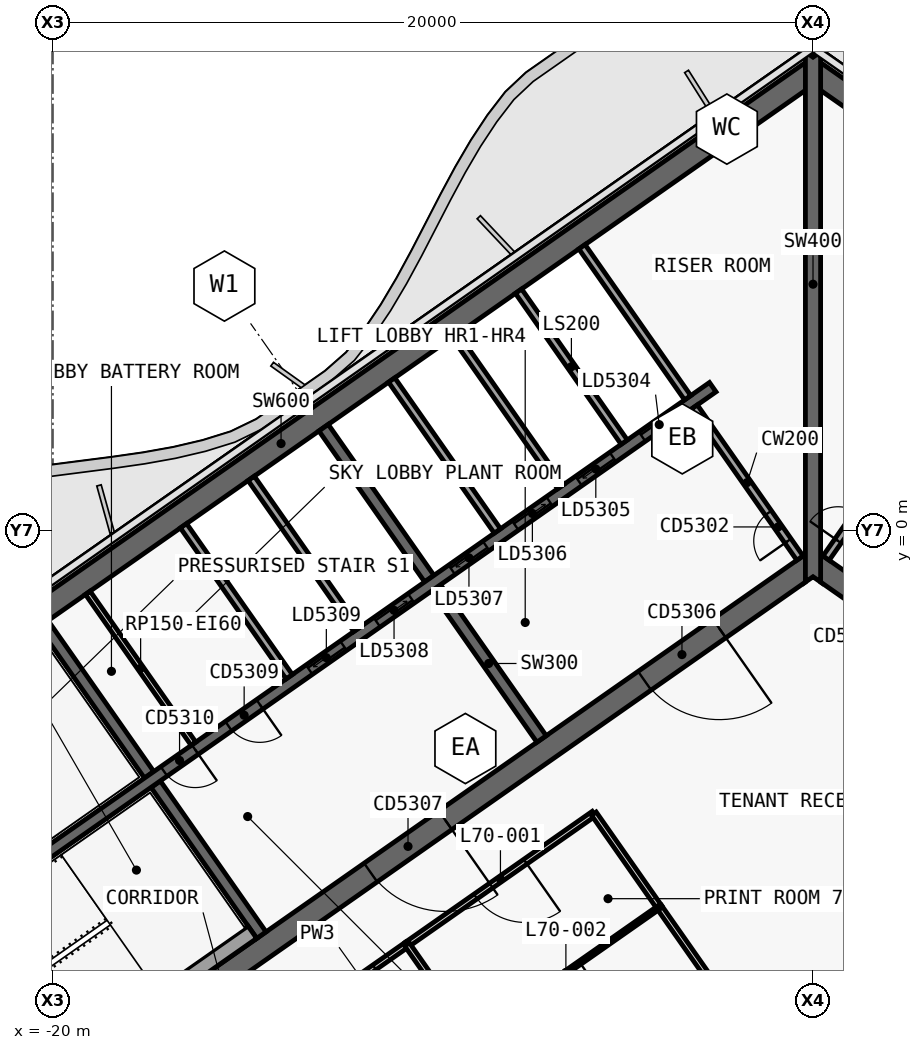
"""IFC4 building model, lengths in metres.
Left out: names, types, materials, properties, quantities, classifications, styles, units other than length and angle.
Written with IfcOpenShell. Run it as: python <this file> out.ifc"""

import sys

from ifc_helpers import new_model, si_unit, direction, frame, frame_2d, origin, place, context, subcontext, project, spatial, polyline, rectangle, outline, extrude, element, fill, save


model = new_model("IFC4")
c1 = context("Model", 3, precision=1e-05, world=origin(), true_north=direction((0.0, 1.0)))
c2 = subcontext(c1, "Body", "Model", "MODEL_VIEW")
j1 = project(units=[si_unit("LENGTHUNIT", "METRE"), si_unit("PLANEANGLEUNIT", "RADIAN")], contexts=[c1])
p1 = place(None, origin())
s1 = spatial("IfcSite", under=j1, at=p1, CompositionType="ELEMENT")
p2 = place(p1, origin())
s2 = spatial("IfcBuilding", under=s1, at=p2, CompositionType="ELEMENT")
p3 = place(p2, frame((0.0, 0.0, 295.6)))
s3 = spatial("IfcBuildingStorey", under=s2, at=p3, CompositionType="ELEMENT", Elevation=295.6)
p4 = place(p3, frame((-0.028, 12.066, 0.0), z_axis=(0.0, 0.0, 1.0), x_axis=(-0.819151382952, -0.573577380837, 0.0)))
e1 = element("IfcWall", 1, at=p4, inside=s3, PredefinedType="SHEAR", context=c2, shape_type="SweptSolid", body=[
    extrude(outline(polyline([(33.898, 0.3), (0.42, 0.3), (0.0, -0.3), (33.898, -0.3), (33.898, 0.3)])), origin(), (0.0, 0.0, 1.0), 3.9),
])
p5 = place(p3, frame((-0.028, -0.874, 0.0), z_axis=(0.0, 0.0, 1.0), x_axis=(-0.819150035022, -0.573579305871, 0.0)))
e2 = element("IfcWall", 2, at=p5, inside=s3, PredefinedType="SHEAR", context=c2, shape_type="SweptSolid", body=[
    extrude(outline(polyline([(26.476, 0.3), (0.42, 0.3), (0.0, -0.3), (26.476, -0.3), (26.476, 0.3)])), origin(), (0.0, 0.0, 1.0), 3.9),
])
p6 = place(p5, frame((2.976, 0.0, 0.0)))
e3 = element("IfcOpeningElement", 3, at=p6, cuts=e2, PredefinedType="OPENING", context=c2, shape_type="SweptSolid", body=[
    extrude(rectangle(XDim=2.4, YDim=2.1, at=frame_2d((1.2, 1.05))), frame((0.0, 0.31, 0.0), z_axis=(0.0, -1.0, 0.0), x_axis=(1.0, 0.0, 0.0)), (0.0, 0.0, 1.0), 0.62),
])
p7 = place(p5, frame((11.776, 0.0, 0.0)))
e4 = element("IfcOpeningElement", 4, at=p7, cuts=e2, PredefinedType="OPENING", context=c2, shape_type="SweptSolid", body=[
    extrude(rectangle(XDim=2.4, YDim=2.1, at=frame_2d((1.2, 1.05))), frame((0.0, 0.31, 0.0), z_axis=(0.0, -1.0, 0.0), x_axis=(1.0, 0.0, 0.0)), (0.0, 0.0, 1.0), 0.62),
])
p8 = place(p3, frame((-7.143, -5.49, 0.0), z_axis=(0.0, 0.0, 1.0), x_axis=(-0.573617744349, 0.819123118565, 0.0)))
e5 = element("IfcWall", 5, at=p8, inside=s3, PredefinedType="SHEAR", context=c2, shape_type="SweptSolid", body=[
    extrude(outline(polyline([(4.85, 0.15), (0.0, 0.15), (0.0, -0.15), (4.85, -0.15), (4.85, 0.15)])), origin(), (0.0, 0.0, 1.0), 3.9),
])
p9 = place(p3, frame((-10.097, -1.271, 0.0), z_axis=(0.0, 0.0, 1.0), x_axis=(-0.573560315113, 0.819163332265, 0.0)))
e6 = element("IfcWall", 6, at=p9, inside=s3, PredefinedType="SHEAR", context=c2, shape_type="SweptSolid", body=[
    extrude(outline(polyline([(4.85, -0.15), (4.85, 0.15), (0.0, 0.15), (0.0, -0.15), (4.85, -0.15)])), origin(), (0.0, 0.0, 1.0), 3.9),
])
p10 = place(p3, frame((-14.515, -10.652, 0.0), z_axis=(0.0, 0.0, 1.0), x_axis=(-0.573560315113, 0.819163332265, 0.0)))
e7 = element("IfcWall", 7, at=p10, inside=s3, PredefinedType="SHEAR", context=c2, shape_type="SweptSolid", body=[
    extrude(outline(polyline([(4.85, 0.15), (0.0, 0.15), (0.0, -0.15), (4.85, -0.15), (4.85, 0.15)])), origin(), (0.0, 0.0, 1.0), 3.9),
])
p11 = place(p3, frame((-17.469, -6.433, 0.0), z_axis=(0.0, 0.0, 1.0), x_axis=(-0.573594092424, 0.81913968109, 0.0)))
e8 = element("IfcWall", 8, at=p11, inside=s3, PredefinedType="SHEAR", context=c2, shape_type="SweptSolid", body=[
    extrude(outline(polyline([(4.85, -0.15), (4.85, 0.15), (0.0, 0.15), (0.0, -0.15), (4.85, -0.15)])), origin(), (0.0, 0.0, 1.0), 3.9),
])
p12 = place(p3, frame((-2.638, 3.768, 0.0), z_axis=(0.0, 0.0, 1.0), x_axis=(-0.819155014212, -0.573572194837, 0.0)))
e9 = element("IfcWall", 9, at=p12, inside=s3, PredefinedType="SHEAR", context=c2, shape_type="SweptSolid", body=[
    extrude(outline(polyline([(26.4, 0.15), (0.0, 0.15), (0.0, -0.15), (26.4, -0.15), (26.4, 0.15)])), origin(), (0.0, 0.0, 1.0), 3.9),
])
p13 = place(p12, frame((1.169, 0.0, 0.0)))
e10 = element("IfcOpeningElement", 10, at=p13, cuts=e9, PredefinedType="OPENING", context=c2, shape_type="SweptSolid", body=[
    extrude(rectangle(XDim=1.1, YDim=2.1, at=frame_2d((0.55, 1.05))), frame((0.0, 0.16, 0.0), z_axis=(0.0, -1.0, 0.0), x_axis=(1.0, 0.0, 0.0)), (0.0, 0.0, 1.0), 0.32),
])
p14 = place(p12, frame((3.206, 0.0, 0.0)))
e11 = element("IfcOpeningElement", 11, at=p14, cuts=e9, PredefinedType="OPENING", context=c2, shape_type="SweptSolid", body=[
    extrude(rectangle(XDim=1.1, YDim=2.1, at=frame_2d((0.55, 1.05))), frame((0.0, 0.16, 0.0), z_axis=(0.0, -1.0, 0.0), x_axis=(1.0, 0.0, 0.0)), (0.0, 0.0, 1.0), 0.32),
])
p15 = place(p12, frame((5.244, 0.0, 0.0)))
e12 = element("IfcOpeningElement", 12, at=p15, cuts=e9, PredefinedType="OPENING", context=c2, shape_type="SweptSolid", body=[
    extrude(rectangle(XDim=1.1, YDim=2.1, at=frame_2d((0.55, 1.05))), frame((0.0, 0.16, 0.0), z_axis=(0.0, -1.0, 0.0), x_axis=(1.0, 0.0, 0.0)), (0.0, 0.0, 1.0), 0.32),
])
p16 = place(p12, frame((7.281, 0.0, 0.0)))
e13 = element("IfcOpeningElement", 13, at=p16, cuts=e9, PredefinedType="OPENING", context=c2, shape_type="SweptSolid", body=[
    extrude(rectangle(XDim=1.1, YDim=2.1, at=frame_2d((0.55, 1.05))), frame((0.0, 0.16, 0.0), z_axis=(0.0, -1.0, 0.0), x_axis=(1.0, 0.0, 0.0)), (0.0, 0.0, 1.0), 0.32),
])
p17 = place(p12, frame((9.688, 0.0, 0.0)))
e14 = element("IfcOpeningElement", 14, at=p17, cuts=e9, PredefinedType="OPENING", context=c2, shape_type="SweptSolid", body=[
    extrude(rectangle(XDim=1.1, YDim=2.1, at=frame_2d((0.55, 1.05))), frame((0.0, 0.16, 0.0), z_axis=(0.0, -1.0, 0.0), x_axis=(1.0, 0.0, 0.0)), (0.0, 0.0, 1.0), 0.32),
])
p18 = place(p12, frame((11.863, 0.0, 0.0)))
e15 = element("IfcOpeningElement", 15, at=p18, cuts=e9, PredefinedType="OPENING", context=c2, shape_type="SweptSolid", body=[
    extrude(rectangle(XDim=1.1, YDim=2.1, at=frame_2d((0.55, 1.05))), frame((0.0, 0.16, 0.0), z_axis=(0.0, -1.0, 0.0), x_axis=(1.0, 0.0, 0.0)), (0.0, 0.0, 1.0), 0.32),
])
p19 = place(p12, frame((14.552, 0.0, 0.0)))
e16 = element("IfcOpeningElement", 16, at=p19, cuts=e9, PredefinedType="OPENING", context=c2, shape_type="SweptSolid", body=[
    extrude(rectangle(XDim=1.0, YDim=2.1, at=frame_2d((0.5, 1.05))), frame((0.0, 0.16, 0.0), z_axis=(0.0, -1.0, 0.0), x_axis=(1.0, 0.0, 0.0)), (0.0, 0.0, 1.0), 0.32),
])
p20 = place(p12, frame((16.627, 0.0, 0.0)))
e17 = element("IfcOpeningElement", 17, at=p20, cuts=e9, PredefinedType="OPENING", context=c2, shape_type="SweptSolid", body=[
    extrude(rectangle(XDim=1.0, YDim=2.1, at=frame_2d((0.5, 1.05))), frame((0.0, 0.16, 0.0), z_axis=(0.0, -1.0, 0.0), x_axis=(1.0, 0.0, 0.0)), (0.0, 0.0, 1.0), 0.32),
])
p21 = place(p3, frame((0.028, 12.066, 0.0), z_axis=(0.0, 0.0, 1.0), x_axis=(0.819151382952, -0.573577380837, 0.0)))
e18 = element("IfcWall", 18, at=p21, inside=s3, PredefinedType="SHEAR", context=c2, shape_type="SweptSolid", body=[
    extrude(outline(polyline([(33.898, 0.3), (0.0, 0.3), (0.42, -0.3), (33.898, -0.3), (33.898, 0.3)])), origin(), (0.0, 0.0, 1.0), 3.9),
])
p22 = place(p3, frame((0.028, -0.874, 0.0), z_axis=(0.0, 0.0, 1.0), x_axis=(0.819150035022, -0.573579305871, 0.0)))
e19 = element("IfcWall", 19, at=p22, inside=s3, PredefinedType="SHEAR", context=c2, shape_type="SweptSolid", body=[
    extrude(outline(polyline([(26.476, 0.3), (0.0, 0.3), (0.42, -0.3), (26.476, -0.3), (26.476, 0.3)])), origin(), (0.0, 0.0, 1.0), 3.9),
])
p23 = place(p22, frame((6.576, 0.0, 0.0)))
e20 = element("IfcOpeningElement", 20, at=p23, cuts=e19, PredefinedType="OPENING", context=c2, shape_type="SweptSolid", body=[
    extrude(rectangle(XDim=1.5, YDim=2.1, at=frame_2d((0.75, 1.05))), frame((0.0, 0.31, 0.0), z_axis=(0.0, -1.0, 0.0), x_axis=(1.0, 0.0, 0.0)), (0.0, 0.0, 1.0), 0.62),
])
p24 = place(p22, frame((12.226, 0.0, 0.0)))
e21 = element("IfcOpeningElement", 21, at=p24, cuts=e19, PredefinedType="OPENING", context=c2, shape_type="SweptSolid", body=[
    extrude(rectangle(XDim=1.5, YDim=2.1, at=frame_2d((0.75, 1.05))), frame((0.0, 0.31, 0.0), z_axis=(0.0, -1.0, 0.0), x_axis=(1.0, 0.0, 0.0)), (0.0, 0.0, 1.0), 0.62),
])
p25 = place(p3, frame((0.0, -1.361, 0.0), z_axis=(0.0, 0.0, 1.0), x_axis=(0.0, 1.0, 0.0)))
e22 = element("IfcWall", 22, at=p25, inside=s3, PredefinedType="SHEAR", context=c2, shape_type="SweptSolid", body=[
    extrude(outline(polyline([(0.14, 0.2), (0.0, 0.2), (0.14, 0.0), (0.0, -0.2), (0.14, -0.2), (1.012, -0.2), (12.94, -0.2), (13.813, -0.2), (13.893, -0.2), (13.933, -0.172), (13.813, 0.0), (13.933, 0.172), (13.893, 0.2), (13.813, 0.2), (12.94, 0.2), (1.012, 0.2), (0.14, 0.2)])), origin(), (0.0, 0.0, 1.0), 3.9),
])
p26 = place(p3, frame((-4.967, 2.321, 0.0), z_axis=(0.0, 0.0, 1.0), x_axis=(-0.573594092424, 0.81913968109, 0.0)))
e23 = element("IfcWall", 23, at=p26, inside=s3, PredefinedType="SOLIDWALL", context=c2, shape_type="SweptSolid", body=[
    extrude(rectangle(XDim=4.85, YDim=0.2, at=frame_2d((2.425, 0.0))), origin(), (0.0, 0.0, 1.0), 3.9),
])
p27 = place(p3, frame((-6.636, 1.152, 0.0), z_axis=(0.0, 0.0, 1.0), x_axis=(-0.573560315113, 0.819163332265, 0.0)))
e24 = element("IfcWall", 24, at=p27, inside=s3, PredefinedType="SOLIDWALL", context=c2, shape_type="SweptSolid", body=[
    extrude(rectangle(XDim=4.85, YDim=0.2, at=frame_2d((2.425, 0.0))), origin(), (0.0, 0.0, 1.0), 3.9),
])
p28 = place(p3, frame((-8.305, -0.017, 0.0), z_axis=(0.0, 0.0, 1.0), x_axis=(-0.573594092424, 0.81913968109, 0.0)))
e25 = element("IfcWall", 25, at=p28, inside=s3, PredefinedType="SOLIDWALL", context=c2, shape_type="SweptSolid", body=[
    extrude(rectangle(XDim=4.85, YDim=0.2, at=frame_2d((2.425, 0.0))), origin(), (0.0, 0.0, 1.0), 3.9),
])
p29 = place(p3, frame((-16.302, -5.616, 0.0), z_axis=(0.0, 0.0, 1.0), x_axis=(-0.573560315113, 0.819163332265, 0.0)))
e26 = element("IfcWall", 26, at=p29, inside=s3, PredefinedType="PARTITIONING", context=c2, shape_type="SweptSolid", body=[
    extrude(rectangle(XDim=4.85, YDim=0.15, at=frame_2d((2.425, 0.0))), origin(), (0.0, 0.0, 1.0), 3.62),
])
p30 = place(p3, frame((-12.001, -2.605, 0.0), z_axis=(0.0, 0.0, 1.0), x_axis=(-0.573560315113, 0.819163332265, 0.0)))
e27 = element("IfcWall", 27, at=p30, inside=s3, PredefinedType="SOLIDWALL", context=c2, shape_type="SweptSolid", body=[
    extrude(rectangle(XDim=4.85, YDim=0.2, at=frame_2d((2.425, 0.0))), origin(), (0.0, 0.0, 1.0), 3.9),
])
p31 = place(p3, frame((-13.783, -3.852, 0.0), z_axis=(0.0, 0.0, 1.0), x_axis=(-0.573594092424, 0.81913968109, 0.0)))
e28 = element("IfcWall", 28, at=p31, inside=s3, PredefinedType="SOLIDWALL", context=c2, shape_type="SweptSolid", body=[
    extrude(rectangle(XDim=4.85, YDim=0.2, at=frame_2d((2.425, 0.0))), origin(), (0.0, 0.0, 1.0), 3.9),
])
p32 = place(p3, frame((-14.753, -10.574, 0.0), z_axis=(0.0, 0.0, 1.0), x_axis=(-0.819158229677, -0.573567602601, 0.0)))
e29 = element("IfcWall", 29, at=p32, inside=s3, PredefinedType="SOLIDWALL", context=c2, shape_type="SweptSolid", body=[
    extrude(rectangle(XDim=8.25, YDim=0.4, at=frame_2d((4.125, 0.0))), origin(), (0.0, 0.0, 1.0), 3.62),
])
p33 = place(p3, frame((-0.344, -0.729, 0.0), z_axis=(0.0, 0.0, 1.0), x_axis=(-0.573560315113, 0.819163332265, 0.0)))
e30 = element("IfcWall", 30, at=p33, inside=s3, PredefinedType="SOLIDWALL", context=c2, shape_type="SweptSolid", body=[
    extrude(rectangle(XDim=4.85, YDim=0.2, at=frame_2d((2.425, 0.0))), origin(), (0.0, 0.0, 1.0), 3.62),
])
p34 = place(p33, frame((0.55, 0.0, 0.0)))
e31 = element("IfcOpeningElement", 31, at=p34, cuts=e30, PredefinedType="OPENING", context=c2, shape_type="SweptSolid", body=[
    extrude(rectangle(XDim=0.9, YDim=2.1, at=frame_2d((0.45, 1.05))), frame((0.0, 0.11, 0.0), z_axis=(0.0, -1.0, 0.0), x_axis=(1.0, 0.0, 0.0)), (0.0, 0.0, 1.0), 0.22),
])
p35 = place(p3, frame((-3.298, 3.49, 0.0), z_axis=(0.0, 0.0, 1.0), x_axis=(-0.573560315113, 0.819163332265, 0.0)))
e32 = element("IfcWall", 32, at=p35, inside=s3, PredefinedType="SOLIDWALL", context=c2, shape_type="SweptSolid", body=[
    extrude(rectangle(XDim=4.85, YDim=0.2, at=frame_2d((2.425, 0.0))), origin(), (0.0, 0.0, 1.0), 3.62),
])
p36 = place(p3, frame((0.344, -0.729, 0.0), z_axis=(0.0, 0.0, 1.0), x_axis=(0.573560315113, 0.819163332265, 0.0)))
e33 = element("IfcWall", 33, at=p36, inside=s3, PredefinedType="SOLIDWALL", context=c2, shape_type="SweptSolid", body=[
    extrude(rectangle(XDim=4.85, YDim=0.2, at=frame_2d((2.425, 0.0))), origin(), (0.0, 0.0, 1.0), 3.62),
])
p37 = place(p36, frame((0.55, 0.0, 0.0)))
e34 = element("IfcOpeningElement", 34, at=p37, cuts=e33, PredefinedType="OPENING", context=c2, shape_type="SweptSolid", body=[
    extrude(rectangle(XDim=0.9, YDim=2.1, at=frame_2d((0.45, 1.05))), frame((0.0, 0.11, 0.0), z_axis=(0.0, -1.0, 0.0), x_axis=(1.0, 0.0, 0.0)), (0.0, 0.0, 1.0), 0.22),
])
p38 = place(p3, frame((-5.766, -7.456, 0.0), z_axis=(0.0, 0.0, 1.0), x_axis=(-0.819147828287, -0.573582457378, 0.0)))
e35 = element("IfcWall", 35, at=p38, inside=s3, PredefinedType="PARTITIONING", context=c2, shape_type="SweptSolid", body=[
    extrude(rectangle(XDim=6.002, YDim=0.15, at=frame_2d((3.001, 0.0))), origin(), (0.0, 0.0, 1.0), 3.05),
])
p39 = place(p38, frame((2.201, 0.0, 0.0)))
e36 = element("IfcOpeningElement", 36, at=p39, cuts=e35, PredefinedType="OPENING", context=c2, shape_type="SweptSolid", body=[
    extrude(rectangle(XDim=1.6, YDim=2.1, at=frame_2d((0.8, 1.05))), frame((0.0, 0.085, 0.0), z_axis=(0.0, -1.0, 0.0), x_axis=(1.0, 0.0, 0.0)), (0.0, 0.0, 1.0), 0.17),
])
p40 = place(p3, frame((-10.68, -10.896, 0.0), z_axis=(0.0, 0.0, 1.0), x_axis=(-0.819128818764, -0.573609604409, 0.0)))
e37 = element("IfcWall", 37, at=p40, inside=s3, PredefinedType="PARTITIONING", context=c2, shape_type="SweptSolid", body=[
    extrude(rectangle(XDim=3.004, YDim=0.15, at=frame_2d((1.502, 0.0))), origin(), (0.0, 0.0, 1.0), 3.05),
])
p41 = place(p40, frame((1.052, 0.0, 0.0)))
e38 = element("IfcOpeningElement", 38, at=p41, cuts=e37, PredefinedType="OPENING", context=c2, shape_type="SweptSolid", body=[
    extrude(rectangle(XDim=0.9, YDim=2.1, at=frame_2d((0.45, 1.05))), frame((0.0, 0.085, 0.0), z_axis=(0.0, -1.0, 0.0), x_axis=(1.0, 0.0, 0.0)), (0.0, 0.0, 1.0), 0.17),
])
p42 = place(p3, frame((-1.849, -13.051, 0.0), z_axis=(0.0, 0.0, 1.0), x_axis=(-0.573586379587, 0.81914508187, 0.0)))
e39 = element("IfcWall", 39, at=p42, inside=s3, PredefinedType="PARTITIONING", context=c2, shape_type="SweptSolid", body=[
    extrude(rectangle(XDim=3.831, YDim=0.15, at=frame_2d((1.916, 0.0))), origin(), (0.0, 0.0, 1.0), 3.05),
])
p43 = place(p3, frame((-4.044, -9.915, 0.0), z_axis=(0.0, 0.0, 1.0), x_axis=(-0.573609604409, 0.819128818764, 0.0)))
e40 = element("IfcWall", 40, at=p43, inside=s3, PredefinedType="PARTITIONING", context=c2, shape_type="SweptSolid", body=[
    extrude(rectangle(XDim=3.004, YDim=0.15, at=frame_2d((1.502, 0.0))), origin(), (0.0, 0.0, 1.0), 3.05),
])
p44 = place(p3, frame((-4.045, -9.914, 0.0), z_axis=(0.0, 0.0, 1.0), x_axis=(-0.819149710902, -0.573579768758, 0.0)))
e41 = element("IfcWall", 41, at=p44, inside=s3, PredefinedType="PARTITIONING", context=c2, shape_type="SweptSolid", body=[
    extrude(rectangle(XDim=6.0, YDim=0.1, at=frame_2d((3.0, 0.0))), origin(), (0.0, 0.0, 1.0), 3.05),
])
p45 = place(p44, frame((2.55, 0.0, 0.0)))
e42 = element("IfcOpeningElement", 42, at=p45, cuts=e41, PredefinedType="OPENING", context=c2, shape_type="SweptSolid", body=[
    extrude(rectangle(XDim=0.9, YDim=2.1, at=frame_2d((0.45, 1.05))), frame((0.0, 0.06, 0.0), z_axis=(0.0, -1.0, 0.0), x_axis=(1.0, 0.0, 0.0)), (0.0, 0.0, 1.0), 0.12),
])
p46 = place(p3, frame((-8.96, -13.355, 0.0), z_axis=(0.0, 0.0, 1.0), x_axis=(-0.573615254604, 0.819124862085, 0.0)))
e43 = element("IfcWall", 43, at=p46, inside=s3, PredefinedType="PARTITIONING", context=c2, shape_type="SweptSolid", body=[
    extrude(rectangle(XDim=3.0, YDim=0.15, at=frame_2d((1.5, 0.0))), origin(), (0.0, 0.0, 1.0), 3.62),
])
p47 = place(p13, origin())
e44 = element("IfcDoor", 44, at=p47, inside=s3, OperationType="SLIDING_TO_LEFT", PredefinedType="DOOR", context=c2, shape_type="SweptSolid", body=[
    extrude(rectangle(XDim=1.1, YDim=2.1, at=frame_2d((0.55, 1.05))), frame((0.0, 0.025, 0.0), z_axis=(0.0, -1.0, 0.0), x_axis=(1.0, 0.0, 0.0)), (0.0, 0.0, 1.0), 0.05),
])
fill(e10, e44)
p48 = place(p14, origin())
e45 = element("IfcDoor", 45, at=p48, inside=s3, OperationType="SLIDING_TO_RIGHT", PredefinedType="DOOR", context=c2, shape_type="SweptSolid", body=[
    extrude(rectangle(XDim=1.1, YDim=2.1, at=frame_2d((0.55, 1.05))), frame((0.0, 0.025, 0.0), z_axis=(0.0, -1.0, 0.0), x_axis=(1.0, 0.0, 0.0)), (0.0, 0.0, 1.0), 0.05),
])
fill(e11, e45)
p49 = place(p15, origin())
e46 = element("IfcDoor", 46, at=p49, inside=s3, OperationType="SLIDING_TO_LEFT", PredefinedType="DOOR", context=c2, shape_type="SweptSolid", body=[
    extrude(rectangle(XDim=1.1, YDim=2.1, at=frame_2d((0.55, 1.05))), frame((0.0, 0.025, 0.0), z_axis=(0.0, -1.0, 0.0), x_axis=(1.0, 0.0, 0.0)), (0.0, 0.0, 1.0), 0.05),
])
fill(e12, e46)
p50 = place(p16, origin())
e47 = element("IfcDoor", 47, at=p50, inside=s3, OperationType="SLIDING_TO_RIGHT", PredefinedType="DOOR", context=c2, shape_type="SweptSolid", body=[
    extrude(rectangle(XDim=1.1, YDim=2.1, at=frame_2d((0.55, 1.05))), frame((0.0, 0.025, 0.0), z_axis=(0.0, -1.0, 0.0), x_axis=(1.0, 0.0, 0.0)), (0.0, 0.0, 1.0), 0.05),
])
fill(e13, e47)
p51 = place(p17, origin())
e48 = element("IfcDoor", 48, at=p51, inside=s3, OperationType="SLIDING_TO_LEFT", PredefinedType="DOOR", context=c2, shape_type="SweptSolid", body=[
    extrude(rectangle(XDim=1.1, YDim=2.1, at=frame_2d((0.55, 1.05))), frame((0.0, 0.025, 0.0), z_axis=(0.0, -1.0, 0.0), x_axis=(1.0, 0.0, 0.0)), (0.0, 0.0, 1.0), 0.05),
])
fill(e14, e48)
p52 = place(p18, origin())
e49 = element("IfcDoor", 49, at=p52, inside=s3, OperationType="SLIDING_TO_RIGHT", PredefinedType="DOOR", context=c2, shape_type="SweptSolid", body=[
    extrude(rectangle(XDim=1.1, YDim=2.1, at=frame_2d((0.55, 1.05))), frame((0.0, 0.025, 0.0), z_axis=(0.0, -1.0, 0.0), x_axis=(1.0, 0.0, 0.0)), (0.0, 0.0, 1.0), 0.05),
])
fill(e15, e49)
p53 = place(p19, origin())
e50 = element("IfcDoor", 50, at=p53, inside=s3, OperationType="SINGLE_SWING_RIGHT", PredefinedType="DOOR", context=c2, shape_type="SweptSolid", body=[
    extrude(rectangle(XDim=1.0, YDim=2.1, at=frame_2d((0.5, 1.05))), frame((0.0, 0.025, 0.0), z_axis=(0.0, -1.0, 0.0), x_axis=(1.0, 0.0, 0.0)), (0.0, 0.0, 1.0), 0.05),
])
fill(e16, e50)
p54 = place(p20, origin())
e51 = element("IfcDoor", 51, at=p54, inside=s3, OperationType="SINGLE_SWING_RIGHT", PredefinedType="DOOR", context=c2, shape_type="SweptSolid", body=[
    extrude(rectangle(XDim=1.0, YDim=2.1, at=frame_2d((0.5, 1.05))), frame((0.0, 0.025, 0.0), z_axis=(0.0, -1.0, 0.0), x_axis=(1.0, 0.0, 0.0)), (0.0, 0.0, 1.0), 0.05),
])
fill(e17, e51)
p55 = place(p6, origin())
e52 = element("IfcDoor", 52, at=p55, inside=s3, OperationType="DOUBLE_DOOR_SINGLE_SWING", PredefinedType="DOOR", context=c2, shape_type="SweptSolid", body=[
    extrude(rectangle(XDim=2.4, YDim=2.1, at=frame_2d((1.2, 1.05))), frame((0.0, 0.025, 0.0), z_axis=(0.0, -1.0, 0.0), x_axis=(1.0, 0.0, 0.0)), (0.0, 0.0, 1.0), 0.05),
])
fill(e3, e52)
p56 = place(p7, origin())
e53 = element("IfcDoor", 53, at=p56, inside=s3, OperationType="DOUBLE_DOOR_SINGLE_SWING", PredefinedType="DOOR", context=c2, shape_type="SweptSolid", body=[
    extrude(rectangle(XDim=2.4, YDim=2.1, at=frame_2d((1.2, 1.05))), frame((0.0, 0.025, 0.0), z_axis=(0.0, -1.0, 0.0), x_axis=(1.0, 0.0, 0.0)), (0.0, 0.0, 1.0), 0.05),
])
fill(e4, e53)
p57 = place(p34, origin())
e54 = element("IfcDoor", 54, at=p57, inside=s3, OperationType="SINGLE_SWING_RIGHT", PredefinedType="DOOR", context=c2, shape_type="SweptSolid", body=[
    extrude(rectangle(XDim=0.9, YDim=2.1, at=frame_2d((0.45, 1.05))), frame((0.0, 0.025, 0.0), z_axis=(0.0, -1.0, 0.0), x_axis=(1.0, 0.0, 0.0)), (0.0, 0.0, 1.0), 0.05),
])
fill(e31, e54)
p58 = place(p37, origin())
e55 = element("IfcDoor", 55, at=p58, inside=s3, OperationType="SINGLE_SWING_RIGHT", PredefinedType="DOOR", context=c2, shape_type="SweptSolid", body=[
    extrude(rectangle(XDim=0.9, YDim=2.1, at=frame_2d((0.45, 1.05))), frame((0.0, 0.025, 0.0), z_axis=(0.0, -1.0, 0.0), x_axis=(1.0, 0.0, 0.0)), (0.0, 0.0, 1.0), 0.05),
])
fill(e34, e55)
p59 = place(p39, origin())
e56 = element("IfcDoor", 56, at=p59, inside=s3, OperationType="DOUBLE_DOOR_SINGLE_SWING", PredefinedType="DOOR", context=c2, shape_type="SweptSolid", body=[
    extrude(rectangle(XDim=1.6, YDim=2.1, at=frame_2d((0.8, 1.05))), frame((0.0, 0.025, 0.0), z_axis=(0.0, -1.0, 0.0), x_axis=(1.0, 0.0, 0.0)), (0.0, 0.0, 1.0), 0.05),
])
fill(e36, e56)
p60 = place(p45, origin())
e57 = element("IfcDoor", 57, at=p60, inside=s3, OperationType="SINGLE_SWING_RIGHT", PredefinedType="DOOR", context=c2, shape_type="SweptSolid", body=[
    extrude(rectangle(XDim=0.9, YDim=2.1, at=frame_2d((0.45, 1.05))), frame((0.0, 0.025, 0.0), z_axis=(0.0, -1.0, 0.0), x_axis=(1.0, 0.0, 0.0)), (0.0, 0.0, 1.0), 0.05),
])
fill(e42, e57)
p61 = place(p41, origin())
e58 = element("IfcDoor", 58, at=p61, inside=s3, OperationType="SINGLE_SWING_RIGHT", PredefinedType="DOOR", context=c2, shape_type="SweptSolid", body=[
    extrude(rectangle(XDim=0.9, YDim=2.1, at=frame_2d((0.45, 1.05))), frame((0.0, 0.025, 0.0), z_axis=(0.0, -1.0, 0.0), x_axis=(1.0, 0.0, 0.0)), (0.0, 0.0, 1.0), 0.05),
])
fill(e38, e58)
save(model, sys.argv[1])
